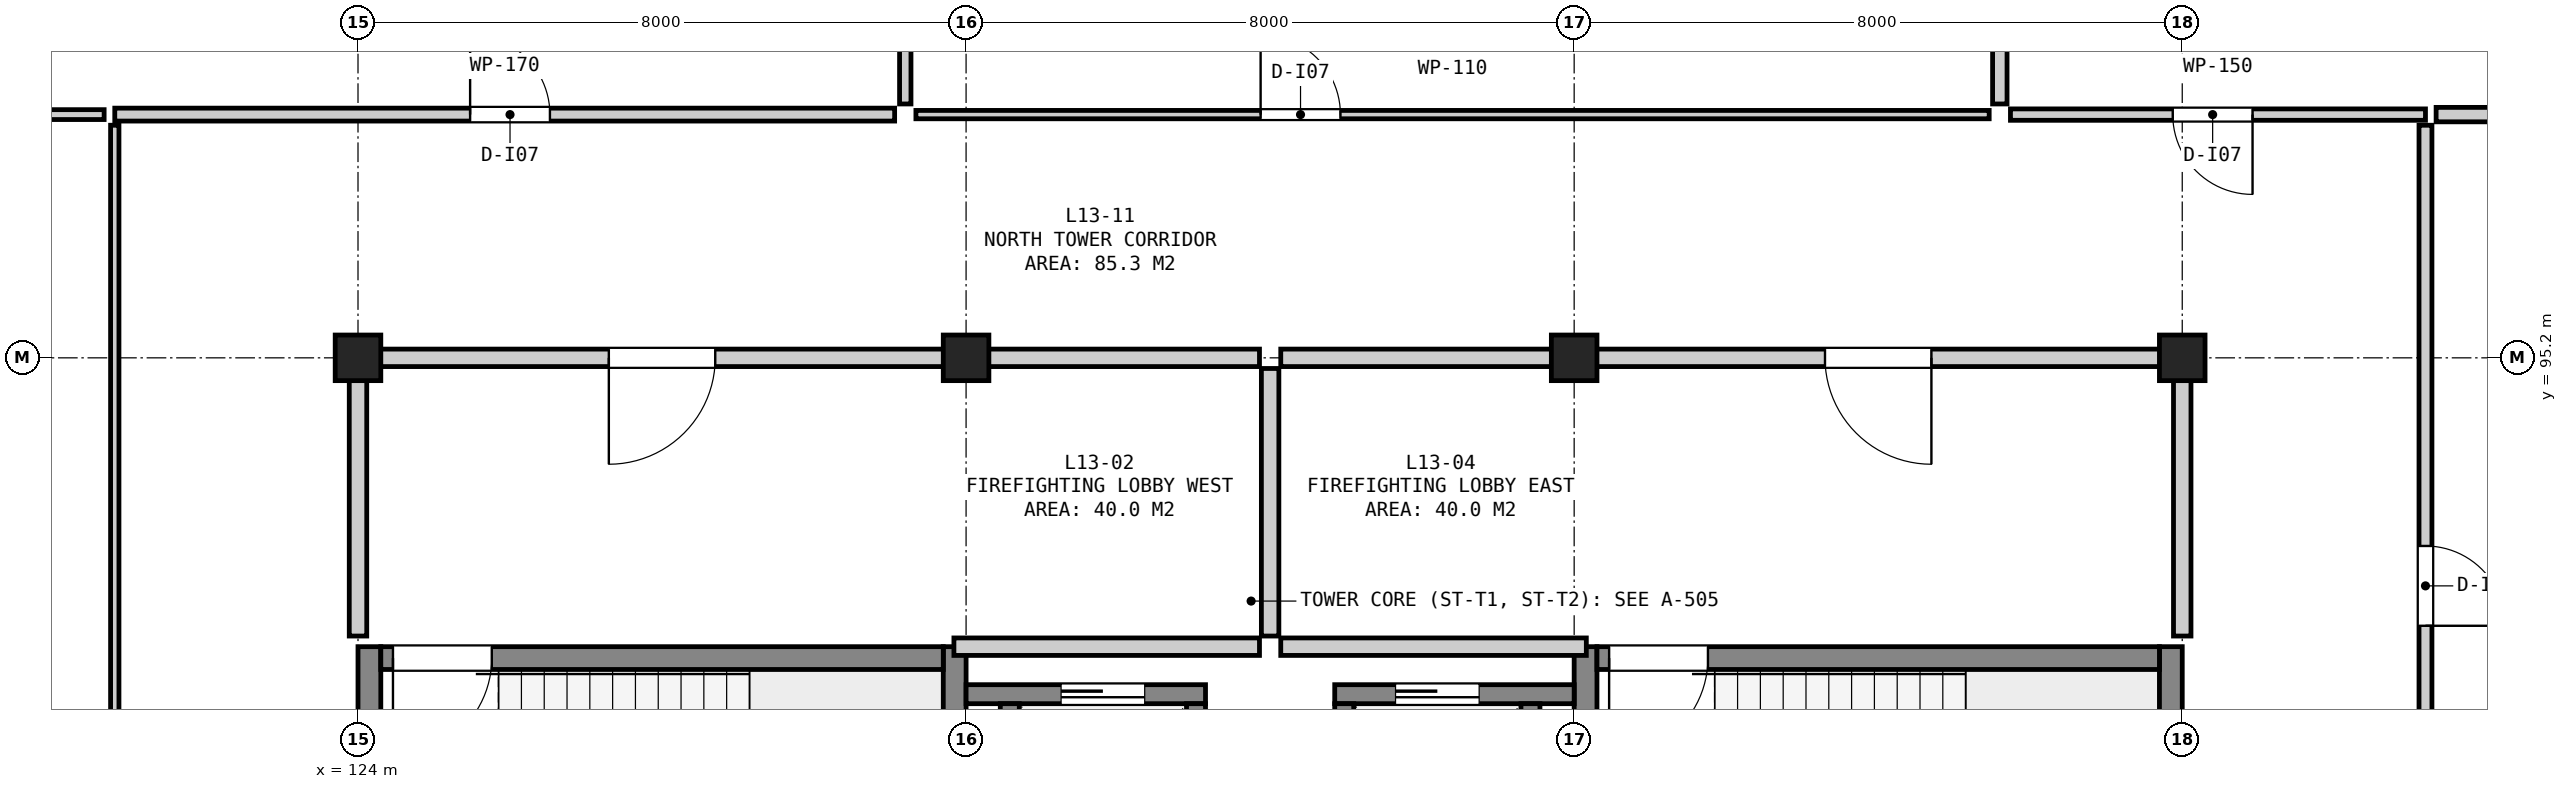
"""IFC4 building model, lengths in metres.
Left out: names, types, materials, properties, quantities, classifications, styles, units other than length and angle.
Written with IfcOpenShell. Run it as: python <this file> out.ifc"""

import sys

from ifc_helpers import new_model, si_unit, direction, frame, frame_2d, origin, origin_2d, place, context, subcontext, project, spatial, rectangle, extrude, element, fill, save


model = new_model("IFC4")
c1 = context("Model", 3, precision=1e-05, world=origin(), true_north=direction((0.0, 1.0)))
c2 = subcontext(c1, "Body", "Model", "MODEL_VIEW")
j1 = project(units=[si_unit("LENGTHUNIT", "METRE"), si_unit("PLANEANGLEUNIT", "RADIAN")], contexts=[c1])
p1 = place(None, origin())
s1 = spatial("IfcSite", under=j1, at=p1, CompositionType="ELEMENT")
p2 = place(p1, origin())
s2 = spatial("IfcBuilding", under=s1, at=p2, CompositionType="ELEMENT")
p3 = place(p2, frame((0.0, 0.0, 54.8)))
s3 = spatial("IfcBuildingStorey", under=s2, at=p3, CompositionType="ELEMENT", Elevation=54.8)
for number, where, z_axis, x_axis in (
    (1, (124.0, 95.2, 0.0), (0.0, 0.0, 1.0), (1.0, 0.0, 0.0)),
    (2, (132.0, 95.2, 0.0), (0.0, 0.0, 1.0), (1.0, 0.0, 0.0)),
    (3, (140.0, 95.2, 0.0), (0.0, 0.0, 1.0), (1.0, 0.0, 0.0)),
    (4, (148.0, 95.2, 0.0), (0.0, 0.0, 1.0), (1.0, 0.0, 0.0)),
):
    element("IfcColumn", number, at=place(p3, frame(where, z_axis=z_axis, x_axis=x_axis)), inside=s3, PredefinedType="COLUMN", context=c2, shape_type="SweptSolid", body=[
        extrude(rectangle(XDim=0.6, YDim=0.6, at=origin_2d()), origin(), (0.0, 0.0, 1.0), 3.9),
    ])
for number, where, z_axis, x_axis in (
    (5, (124.15, 87.2, 0.0), (0.0, 0.0, 1.0), (0.0, 1.0, 0.0)),
    (6, (131.85, 87.2, 0.0), (0.0, 0.0, 1.0), (0.0, 1.0, 0.0)),
):
    element("IfcWall", number, at=place(p3, frame(where, z_axis=z_axis, x_axis=x_axis)), inside=s3, PredefinedType="SHEAR", context=c2, shape_type="SweptSolid", body=[
        extrude(rectangle(XDim=4.2, YDim=0.3, at=frame_2d((2.1, 0.0))), origin(), (0.0, 0.0, 1.0), 3.62),
    ])
p4 = place(p3, frame((124.3, 91.25, 0.0), z_axis=(0.0, 0.0, 1.0), x_axis=(1.0, 0.0, 0.0)))
e7 = element("IfcWall", 7, at=p4, inside=s3, PredefinedType="SHEAR", context=c2, shape_type="SweptSolid", body=[
    extrude(rectangle(XDim=7.4, YDim=0.3, at=frame_2d((3.7, 0.0))), origin(), (0.0, 0.0, 1.0), 3.62),
])
p5 = place(p4, frame((0.16, 0.0, 0.0)))
e8 = element("IfcOpeningElement", 8, at=p5, cuts=e7, PredefinedType="OPENING", context=c2, shape_type="SweptSolid", body=[
    extrude(rectangle(XDim=1.3, YDim=2.18, at=frame_2d((0.65, 1.09))), frame((0.0, 0.162, 0.0), z_axis=(0.0, -1.0, 0.0), x_axis=(1.0, 0.0, 0.0)), (0.0, 0.0, 1.0), 0.324),
])
for number, where, z_axis, x_axis in (
    (9, (140.15, 87.2, 0.0), (0.0, 0.0, 1.0), (0.0, 1.0, 0.0)),
    (10, (147.85, 87.2, 0.0), (0.0, 0.0, 1.0), (0.0, 1.0, 0.0)),
):
    element("IfcWall", number, at=place(p3, frame(where, z_axis=z_axis, x_axis=x_axis)), inside=s3, PredefinedType="SHEAR", context=c2, shape_type="SweptSolid", body=[
        extrude(rectangle(XDim=4.2, YDim=0.3, at=frame_2d((2.1, 0.0))), origin(), (0.0, 0.0, 1.0), 3.62),
    ])
p6 = place(p3, frame((140.3, 91.25, 0.0), z_axis=(0.0, 0.0, 1.0), x_axis=(1.0, 0.0, 0.0)))
e11 = element("IfcWall", 11, at=p6, inside=s3, PredefinedType="SHEAR", context=c2, shape_type="SweptSolid", body=[
    extrude(rectangle(XDim=7.4, YDim=0.3, at=frame_2d((3.7, 0.0))), origin(), (0.0, 0.0, 1.0), 3.62),
])
p7 = place(p6, frame((0.16, 0.0, 0.0)))
e12 = element("IfcOpeningElement", 12, at=p7, cuts=e11, PredefinedType="OPENING", context=c2, shape_type="SweptSolid", body=[
    extrude(rectangle(XDim=1.3, YDim=2.18, at=frame_2d((0.65, 1.09))), frame((0.0, 0.162, 0.0), z_axis=(0.0, -1.0, 0.0), x_axis=(1.0, 0.0, 0.0)), (0.0, 0.0, 1.0), 0.324),
])
p8 = place(p3, frame((132.0, 90.775, 0.0), z_axis=(0.0, 0.0, 1.0), x_axis=(1.0, 0.0, 0.0)))
e13 = element("IfcWall", 13, at=p8, inside=s3, PredefinedType="SHEAR", context=c2, shape_type="SweptSolid", body=[
    extrude(rectangle(XDim=3.15, YDim=0.25, at=frame_2d((1.575, 0.0))), origin(), (0.0, 0.0, 1.0), 3.62),
])
p9 = place(p8, frame((1.25, 0.0, 0.0)))
e14 = element("IfcOpeningElement", 14, at=p9, cuts=e13, PredefinedType="OPENING", context=c2, shape_type="SweptSolid", body=[
    extrude(rectangle(XDim=1.1, YDim=2.15, at=frame_2d((0.55, 1.075))), frame((0.0, 0.137, 0.0), z_axis=(0.0, -1.0, 0.0), x_axis=(1.0, 0.0, 0.0)), (0.0, 0.0, 1.0), 0.274),
])
for number, where, z_axis, x_axis in (
    (15, (132.575, 87.75, 0.0), (0.0, 0.0, 1.0), (0.0, 1.0, 0.0)),
    (16, (135.025, 87.75, 0.0), (0.0, 0.0, 1.0), (0.0, 1.0, 0.0)),
):
    element("IfcWall", number, at=place(p3, frame(where, z_axis=z_axis, x_axis=x_axis)), inside=s3, PredefinedType="SHEAR", context=c2, shape_type="SweptSolid", body=[
        extrude(rectangle(XDim=2.9, YDim=0.25, at=frame_2d((1.45, 0.0))), origin(), (0.0, 0.0, 1.0), 3.62),
    ])
p10 = place(p3, frame((136.85, 90.775, 0.0), z_axis=(0.0, 0.0, 1.0), x_axis=(1.0, 0.0, 0.0)))
e17 = element("IfcWall", 17, at=p10, inside=s3, PredefinedType="SHEAR", context=c2, shape_type="SweptSolid", body=[
    extrude(rectangle(XDim=3.15, YDim=0.25, at=frame_2d((1.575, 0.0))), origin(), (0.0, 0.0, 1.0), 3.62),
])
p11 = place(p10, frame((0.8, 0.0, 0.0)))
e18 = element("IfcOpeningElement", 18, at=p11, cuts=e17, PredefinedType="OPENING", context=c2, shape_type="SweptSolid", body=[
    extrude(rectangle(XDim=1.1, YDim=2.15, at=frame_2d((0.55, 1.075))), frame((0.0, 0.137, 0.0), z_axis=(0.0, -1.0, 0.0), x_axis=(1.0, 0.0, 0.0)), (0.0, 0.0, 1.0), 0.274),
])
for number, where, z_axis, x_axis in (
    (19, (136.975, 87.75, 0.0), (0.0, 0.0, 1.0), (0.0, 1.0, 0.0)),
    (20, (139.425, 87.75, 0.0), (0.0, 0.0, 1.0), (0.0, 1.0, 0.0)),
):
    element("IfcWall", number, at=place(p3, frame(where, z_axis=z_axis, x_axis=x_axis)), inside=s3, PredefinedType="SHEAR", context=c2, shape_type="SweptSolid", body=[
        extrude(rectangle(XDim=2.9, YDim=0.25, at=frame_2d((1.45, 0.0))), origin(), (0.0, 0.0, 1.0), 3.62),
    ])
p12 = place(p3, frame((131.84, 91.4, 0.0), z_axis=(0.0, 0.0, 1.0), x_axis=(1.0, 0.0, 0.0)))
e21 = element("IfcWall", 21, at=p12, inside=s3, PredefinedType="SOLIDWALL", context=c2, shape_type="SweptSolid", body=[
    extrude(rectangle(XDim=4.02, YDim=0.23, at=frame_2d((2.01, 0.0))), origin(), (0.0, 0.0, 1.0), 3.62),
])
p13 = place(p3, frame((124.14, 95.2, 0.0), z_axis=(0.0, 0.0, 1.0), x_axis=(1.0, 0.0, 0.0)))
e22 = element("IfcWall", 22, at=p13, inside=s3, PredefinedType="SOLIDWALL", context=c2, shape_type="SweptSolid", body=[
    extrude(rectangle(XDim=11.72, YDim=0.23, at=frame_2d((5.86, 0.0))), origin(), (0.0, 0.0, 1.0), 3.055),
])
p14 = place(p13, frame((3.16, 0.0, 0.0)))
e23 = element("IfcOpeningElement", 23, at=p14, cuts=e22, PredefinedType="OPENING", context=c2, shape_type="SweptSolid", body=[
    extrude(rectangle(XDim=1.4, YDim=2.2, at=frame_2d((0.7, 1.1))), frame((0.0, 0.127, 0.0), z_axis=(0.0, -1.0, 0.0), x_axis=(1.0, 0.0, 0.0)), (0.0, 0.0, 1.0), 0.254),
])
p15 = place(p3, frame((124.0, 91.54, 0.0), z_axis=(0.0, 0.0, 1.0), x_axis=(0.0, 1.0, 0.0)))
e24 = element("IfcWall", 24, at=p15, inside=s3, PredefinedType="SOLIDWALL", context=c2, shape_type="SweptSolid", body=[
    extrude(rectangle(XDim=3.52, YDim=0.23, at=frame_2d((1.76, 0.0))), origin(), (0.0, 0.0, 1.0), 3.055),
])
p16 = place(p3, frame((136.0, 91.54, 0.0), z_axis=(0.0, 0.0, 1.0), x_axis=(0.0, 1.0, 0.0)))
e25 = element("IfcWall", 25, at=p16, inside=s3, PredefinedType="SOLIDWALL", context=c2, shape_type="SweptSolid", body=[
    extrude(rectangle(XDim=3.52, YDim=0.23, at=frame_2d((1.76, 0.0))), origin(), (0.0, 0.0, 1.0), 3.62),
])
p17 = place(p3, frame((136.14, 91.4, 0.0), z_axis=(0.0, 0.0, 1.0), x_axis=(1.0, 0.0, 0.0)))
e26 = element("IfcWall", 26, at=p17, inside=s3, PredefinedType="SOLIDWALL", context=c2, shape_type="SweptSolid", body=[
    extrude(rectangle(XDim=4.02, YDim=0.23, at=frame_2d((2.01, 0.0))), origin(), (0.0, 0.0, 1.0), 3.62),
])
p18 = place(p3, frame((136.14, 95.2, 0.0), z_axis=(0.0, 0.0, 1.0), x_axis=(1.0, 0.0, 0.0)))
e27 = element("IfcWall", 27, at=p18, inside=s3, PredefinedType="SOLIDWALL", context=c2, shape_type="SweptSolid", body=[
    extrude(rectangle(XDim=11.72, YDim=0.23, at=frame_2d((5.86, 0.0))), origin(), (0.0, 0.0, 1.0), 3.055),
])
p19 = place(p18, frame((7.16, 0.0, 0.0)))
e28 = element("IfcOpeningElement", 28, at=p19, cuts=e27, PredefinedType="OPENING", context=c2, shape_type="SweptSolid", body=[
    extrude(rectangle(XDim=1.4, YDim=2.2, at=frame_2d((0.7, 1.1))), frame((0.0, 0.127, 0.0), z_axis=(0.0, -1.0, 0.0), x_axis=(1.0, 0.0, 0.0)), (0.0, 0.0, 1.0), 0.254),
])
p20 = place(p3, frame((148.0, 91.54, 0.0), z_axis=(0.0, 0.0, 1.0), x_axis=(0.0, 1.0, 0.0)))
e29 = element("IfcWall", 29, at=p20, inside=s3, PredefinedType="SOLIDWALL", context=c2, shape_type="SweptSolid", body=[
    extrude(rectangle(XDim=3.52, YDim=0.23, at=frame_2d((1.76, 0.0))), origin(), (0.0, 0.0, 1.0), 3.205),
])
p21 = place(p3, frame((151.34, 98.4, 0.0), z_axis=(0.0, 0.0, 1.0), x_axis=(1.0, 0.0, 0.0)))
e30 = element("IfcWall", 30, at=p21, inside=s3, PredefinedType="PARTITIONING", context=c2, shape_type="SweptSolid", body=[
    extrude(rectangle(XDim=16.485, YDim=0.19, at=frame_2d((8.242, 0.0))), origin(), (0.0, 0.0, 1.0), 3.62),
])
p22 = place(p3, frame((151.2, 86.54, 0.0), z_axis=(0.0, 0.0, 1.0), x_axis=(0.0, 1.0, 0.0)))
e31 = element("IfcWall", 31, at=p22, inside=s3, PredefinedType="PARTITIONING", context=c2, shape_type="SweptSolid", body=[
    extrude(rectangle(XDim=11.72, YDim=0.17, at=frame_2d((5.86, 0.0))), origin(), (0.0, 0.0, 1.0), 3.62),
])
p23 = place(p22, frame((5.135, 0.0, 0.0)))
e32 = element("IfcOpeningElement", 32, at=p23, cuts=e31, PredefinedType="OPENING", context=c2, shape_type="SweptSolid", body=[
    extrude(rectangle(XDim=1.05, YDim=2.15, at=frame_2d((0.525, 1.075))), frame((0.0, 0.097, 0.0), z_axis=(0.0, -1.0, 0.0), x_axis=(1.0, 0.0, 0.0)), (0.0, 0.0, 1.0), 0.194),
])
p24 = place(p3, frame((116.975, 98.4, 0.0), z_axis=(0.0, 0.0, 1.0), x_axis=(1.0, 0.0, 0.0)))
e33 = element("IfcWall", 33, at=p24, inside=s3, PredefinedType="PARTITIONING", context=c2, shape_type="SweptSolid", body=[
    extrude(rectangle(XDim=3.685, YDim=0.13, at=frame_2d((1.842, 0.0))), origin(), (0.0, 0.0, 1.0), 3.62),
])
p25 = place(p3, frame((120.8, 76.14, 0.0), z_axis=(0.0, 0.0, 1.0), x_axis=(0.0, 1.0, 0.0)))
e34 = element("IfcWall", 34, at=p25, inside=s3, PredefinedType="PARTITIONING", context=c2, shape_type="SweptSolid", body=[
    extrude(rectangle(XDim=22.12, YDim=0.11, at=frame_2d((11.06, 0.0))), origin(), (0.0, 0.0, 1.0), 3.62),
])
p26 = place(p25, frame((6.535, 0.0, 0.0)))
e35 = element("IfcOpeningElement", 35, at=p26, cuts=e34, PredefinedType="OPENING", context=c2, shape_type="SweptSolid", body=[
    extrude(rectangle(XDim=1.05, YDim=2.15, at=frame_2d((0.525, 1.075))), frame((0.0, 0.067, 0.0), z_axis=(0.0, -1.0, 0.0), x_axis=(1.0, 0.0, 0.0)), (0.0, 0.0, 1.0), 0.134),
])
p27 = place(p3, frame((120.8, 98.4, 0.0), z_axis=(0.0, 0.0, 1.0), x_axis=(1.0, 0.0, 0.0)))
e36 = element("IfcWall", 36, at=p27, inside=s3, PredefinedType="PARTITIONING", context=c2, shape_type="SweptSolid", body=[
    extrude(rectangle(XDim=10.26, YDim=0.17, at=frame_2d((5.13, 0.0))), origin(), (0.0, 0.0, 1.0), 3.62),
])
p28 = place(p27, frame((4.675, 0.0, 0.0)))
e37 = element("IfcOpeningElement", 37, at=p28, cuts=e36, PredefinedType="OPENING", context=c2, shape_type="SweptSolid", body=[
    extrude(rectangle(XDim=1.05, YDim=2.15, at=frame_2d((0.525, 1.075))), frame((0.0, 0.097, 0.0), z_axis=(0.0, -1.0, 0.0), x_axis=(1.0, 0.0, 0.0)), (0.0, 0.0, 1.0), 0.194),
])
p29 = place(p3, frame((131.2, 98.54, 0.0), z_axis=(0.0, 0.0, 1.0), x_axis=(0.0, 1.0, 0.0)))
e38 = element("IfcWall", 38, at=p29, inside=s3, PredefinedType="PARTITIONING", context=c2, shape_type="SweptSolid", body=[
    extrude(rectangle(XDim=16.485, YDim=0.15, at=frame_2d((8.242, 0.0))), origin(), (0.0, 0.0, 1.0), 3.62),
])
p30 = place(p3, frame((131.34, 98.4, 0.0), z_axis=(0.0, 0.0, 1.0), x_axis=(1.0, 0.0, 0.0)))
e39 = element("IfcWall", 39, at=p30, inside=s3, PredefinedType="PARTITIONING", context=c2, shape_type="SweptSolid", body=[
    extrude(rectangle(XDim=14.12, YDim=0.11, at=frame_2d((7.06, 0.0))), origin(), (0.0, 0.0, 1.0), 3.62),
])
p31 = place(p30, frame((4.535, 0.0, 0.0)))
e40 = element("IfcOpeningElement", 40, at=p31, cuts=e39, PredefinedType="OPENING", context=c2, shape_type="SweptSolid", body=[
    extrude(rectangle(XDim=1.05, YDim=2.15, at=frame_2d((0.525, 1.075))), frame((0.0, 0.067, 0.0), z_axis=(0.0, -1.0, 0.0), x_axis=(1.0, 0.0, 0.0)), (0.0, 0.0, 1.0), 0.134),
])
p32 = place(p3, frame((145.6, 98.54, 0.0), z_axis=(0.0, 0.0, 1.0), x_axis=(0.0, 1.0, 0.0)))
e41 = element("IfcWall", 41, at=p32, inside=s3, PredefinedType="PARTITIONING", context=c2, shape_type="SweptSolid", body=[
    extrude(rectangle(XDim=16.485, YDim=0.19, at=frame_2d((8.242, 0.0))), origin(), (0.0, 0.0, 1.0), 3.62),
])
p33 = place(p3, frame((145.74, 98.4, 0.0), z_axis=(0.0, 0.0, 1.0), x_axis=(1.0, 0.0, 0.0)))
e42 = element("IfcWall", 42, at=p33, inside=s3, PredefinedType="PARTITIONING", context=c2, shape_type="SweptSolid", body=[
    extrude(rectangle(XDim=5.46, YDim=0.15, at=frame_2d((2.73, 0.0))), origin(), (0.0, 0.0, 1.0), 3.62),
])
p34 = place(p33, frame((2.135, 0.0, 0.0)))
e43 = element("IfcOpeningElement", 43, at=p34, cuts=e42, PredefinedType="OPENING", context=c2, shape_type="SweptSolid", body=[
    extrude(rectangle(XDim=1.05, YDim=2.15, at=frame_2d((0.525, 1.075))), frame((0.0, 0.087, 0.0), z_axis=(0.0, -1.0, 0.0), x_axis=(1.0, 0.0, 0.0)), (0.0, 0.0, 1.0), 0.174),
])
p35 = place(p5, frame((1.3, 0.0, 0.0), z_axis=(0.0, 0.0, 1.0), x_axis=(-1.0, 0.0, 0.0)))
e44 = element("IfcDoor", 44, at=p35, inside=s3, OperationType="SINGLE_SWING_RIGHT", PredefinedType="DOOR", context=c2, shape_type="SweptSolid", body=[
    extrude(rectangle(XDim=1.3, YDim=2.18, at=frame_2d((0.65, 1.09))), frame((0.0, 0.025, 0.0), z_axis=(0.0, -1.0, 0.0), x_axis=(1.0, 0.0, 0.0)), (0.0, 0.0, 1.0), 0.05),
])
fill(e8, e44)
p36 = place(p7, frame((1.3, 0.0, 0.0), z_axis=(0.0, 0.0, 1.0), x_axis=(-1.0, 0.0, 0.0)))
e45 = element("IfcDoor", 45, at=p36, inside=s3, OperationType="SINGLE_SWING_RIGHT", PredefinedType="DOOR", context=c2, shape_type="SweptSolid", body=[
    extrude(rectangle(XDim=1.3, YDim=2.18, at=frame_2d((0.65, 1.09))), frame((0.0, 0.025, 0.0), z_axis=(0.0, -1.0, 0.0), x_axis=(1.0, 0.0, 0.0)), (0.0, 0.0, 1.0), 0.05),
])
fill(e12, e45)
p37 = place(p9, origin())
e46 = element("IfcDoor", 46, at=p37, inside=s3, OperationType="SLIDING_TO_LEFT", PredefinedType="DOOR", context=c2, shape_type="SweptSolid", body=[
    extrude(rectangle(XDim=1.1, YDim=2.15, at=frame_2d((0.55, 1.075))), frame((0.0, 0.025, 0.0), z_axis=(0.0, -1.0, 0.0), x_axis=(1.0, 0.0, 0.0)), (0.0, 0.0, 1.0), 0.05),
])
fill(e14, e46)
p38 = place(p11, origin())
e47 = element("IfcDoor", 47, at=p38, inside=s3, OperationType="SLIDING_TO_LEFT", PredefinedType="DOOR", context=c2, shape_type="SweptSolid", body=[
    extrude(rectangle(XDim=1.1, YDim=2.15, at=frame_2d((0.55, 1.075))), frame((0.0, 0.025, 0.0), z_axis=(0.0, -1.0, 0.0), x_axis=(1.0, 0.0, 0.0)), (0.0, 0.0, 1.0), 0.05),
])
fill(e18, e47)
p39 = place(p14, frame((1.4, 0.0, 0.0), z_axis=(0.0, 0.0, 1.0), x_axis=(-1.0, 0.0, 0.0)))
e48 = element("IfcDoor", 48, at=p39, inside=s3, OperationType="SINGLE_SWING_RIGHT", PredefinedType="DOOR", context=c2, shape_type="SweptSolid", body=[
    extrude(rectangle(XDim=1.4, YDim=2.2, at=frame_2d((0.7, 1.1))), frame((0.0, 0.025, 0.0), z_axis=(0.0, -1.0, 0.0), x_axis=(1.0, 0.0, 0.0)), (0.0, 0.0, 1.0), 0.05),
])
fill(e23, e48)
p40 = place(p19, frame((1.4, 0.0, 0.0), z_axis=(0.0, 0.0, 1.0), x_axis=(-1.0, 0.0, 0.0)))
e49 = element("IfcDoor", 49, at=p40, inside=s3, OperationType="SINGLE_SWING_LEFT", PredefinedType="DOOR", context=c2, shape_type="SweptSolid", body=[
    extrude(rectangle(XDim=1.4, YDim=2.2, at=frame_2d((0.7, 1.1))), frame((0.0, 0.025, 0.0), z_axis=(0.0, -1.0, 0.0), x_axis=(1.0, 0.0, 0.0)), (0.0, 0.0, 1.0), 0.05),
])
fill(e28, e49)
p41 = place(p23, frame((1.05, 0.0, 0.0), z_axis=(0.0, 0.0, 1.0), x_axis=(-1.0, 0.0, 0.0)))
e50 = element("IfcDoor", 50, at=p41, inside=s3, OperationType="SINGLE_SWING_RIGHT", PredefinedType="DOOR", context=c2, shape_type="SweptSolid", body=[
    extrude(rectangle(XDim=1.05, YDim=2.15, at=frame_2d((0.525, 1.075))), frame((0.0, 0.025, 0.0), z_axis=(0.0, -1.0, 0.0), x_axis=(1.0, 0.0, 0.0)), (0.0, 0.0, 1.0), 0.05),
])
fill(e32, e50)
p42 = place(p28, origin())
e51 = element("IfcDoor", 51, at=p42, inside=s3, OperationType="SINGLE_SWING_LEFT", PredefinedType="DOOR", context=c2, shape_type="SweptSolid", body=[
    extrude(rectangle(XDim=1.05, YDim=2.15, at=frame_2d((0.525, 1.075))), frame((0.0, 0.025, 0.0), z_axis=(0.0, -1.0, 0.0), x_axis=(1.0, 0.0, 0.0)), (0.0, 0.0, 1.0), 0.05),
])
fill(e37, e51)
p43 = place(p31, origin())
e52 = element("IfcDoor", 52, at=p43, inside=s3, OperationType="SINGLE_SWING_LEFT", PredefinedType="DOOR", context=c2, shape_type="SweptSolid", body=[
    extrude(rectangle(XDim=1.05, YDim=2.15, at=frame_2d((0.525, 1.075))), frame((0.0, 0.025, 0.0), z_axis=(0.0, -1.0, 0.0), x_axis=(1.0, 0.0, 0.0)), (0.0, 0.0, 1.0), 0.05),
])
fill(e40, e52)
p44 = place(p34, frame((1.05, 0.0, 0.0), z_axis=(0.0, 0.0, 1.0), x_axis=(-1.0, 0.0, 0.0)))
e53 = element("IfcDoor", 53, at=p44, inside=s3, OperationType="SINGLE_SWING_LEFT", PredefinedType="DOOR", context=c2, shape_type="SweptSolid", body=[
    extrude(rectangle(XDim=1.05, YDim=2.15, at=frame_2d((0.525, 1.075))), frame((0.0, 0.025, 0.0), z_axis=(0.0, -1.0, 0.0), x_axis=(1.0, 0.0, 0.0)), (0.0, 0.0, 1.0), 0.05),
])
fill(e43, e53)
save(model, sys.argv[1])
